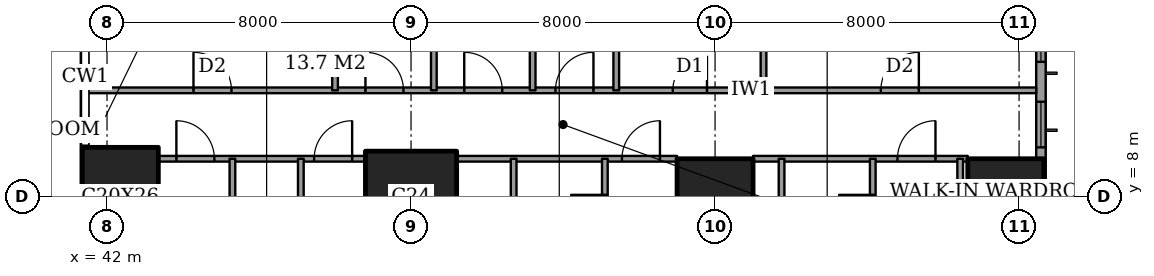
"""IFC4 building model, lengths in metres.
Left out: names, types, materials, properties, quantities, classifications, styles, units other than length and angle.
Written with IfcOpenShell. Run it as: python <this file> out.ifc"""

import sys

from ifc_helpers import new_model, si_unit, direction, frame, frame_2d, origin, origin_2d, place, context, subcontext, project, spatial, rectangle, extrude, element, fill, save


model = new_model("IFC4")
c1 = context("Model", 3, precision=1e-05, world=origin(), true_north=direction((0.0, 1.0)))
c2 = subcontext(c1, "Body", "Model", "MODEL_VIEW")
j1 = project(units=[si_unit("LENGTHUNIT", "METRE"), si_unit("PLANEANGLEUNIT", "RADIAN")], contexts=[c1])
p1 = place(None, origin())
s1 = spatial("IfcSite", under=j1, at=p1, CompositionType="ELEMENT")
p2 = place(p1, origin())
s2 = spatial("IfcBuilding", under=s1, at=p2, CompositionType="ELEMENT")
p3 = place(p2, frame((0.0, 0.0, 51.2)))
s3 = spatial("IfcBuildingStorey", under=s2, at=p3, CompositionType="ELEMENT", Elevation=51.2)
p4 = place(p3, frame((42.35, 8.0, 0.0), z_axis=(0.0, 0.0, 1.0), x_axis=(1.0, 0.0, 0.0)))
e1 = element("IfcColumn", 1, at=p4, inside=s3, PredefinedType="COLUMN", context=c2, shape_type="SweptSolid", body=[
    extrude(rectangle(XDim=2.0, YDim=2.6, at=origin_2d()), origin(), (0.0, 0.0, 1.0), 3.6),
])
p5 = place(p3, frame((50.0, 8.0, 0.0), z_axis=(0.0, 0.0, 1.0), x_axis=(1.0, 0.0, 0.0)))
e2 = element("IfcColumn", 2, at=p5, inside=s3, PredefinedType="COLUMN", context=c2, shape_type="SweptSolid", body=[
    extrude(rectangle(XDim=2.4, YDim=2.4, at=origin_2d()), origin(), (0.0, 0.0, 1.0), 3.6),
])
for number, where, z_axis, x_axis in (
    (3, (58.0, 8.0, 0.0), (0.0, 0.0, 1.0), (1.0, 0.0, 0.0)),
    (4, (65.65, 8.0, 0.0), (0.0, 0.0, 1.0), (1.0, 0.0, 0.0)),
):
    element("IfcColumn", number, at=place(p3, frame(where, z_axis=z_axis, x_axis=x_axis)), inside=s3, PredefinedType="COLUMN", context=c2, shape_type="SweptSolid", body=[
        extrude(rectangle(XDim=2.0, YDim=2.0, at=origin_2d()), origin(), (0.0, 0.0, 1.0), 3.6),
    ])
p6 = place(p3, frame((66.575, 3.175, 0.0), z_axis=(0.0, 0.0, 1.0), x_axis=(0.0, 1.0, 0.0)))
e5 = element("IfcWall", 5, at=p6, inside=s3, PredefinedType="SOLIDWALL", context=c2, shape_type="SweptSolid", body=[
    extrude(rectangle(XDim=41.65, YDim=0.25, at=frame_2d((20.825, 0.0))), origin(), (0.0, 0.0, 1.0), 3.6),
])
p7 = place(p6, frame((0.775, 0.0, 0.6)))
e6 = element("IfcOpeningElement", 6, at=p7, cuts=e5, PredefinedType="OPENING", context=c2, shape_type="SweptSolid", body=[
    extrude(rectangle(XDim=2.4, YDim=2.0, at=frame_2d((1.2, 1.0))), frame((0.0, 0.135, 0.0), z_axis=(0.0, -1.0, 0.0), x_axis=(1.0, 0.0, 0.0)), (0.0, 0.0, 1.0), 0.27),
])
p8 = place(p6, frame((6.125, 0.0, 0.6)))
e7 = element("IfcOpeningElement", 7, at=p8, cuts=e5, PredefinedType="OPENING", context=c2, shape_type="SweptSolid", body=[
    extrude(rectangle(XDim=1.2, YDim=2.0, at=frame_2d((0.6, 1.0))), frame((0.0, 0.135, 0.0), z_axis=(0.0, -1.0, 0.0), x_axis=(1.0, 0.0, 0.0)), (0.0, 0.0, 1.0), 0.27),
])
p9 = place(p6, frame((8.375, 0.0, 0.6)))
e8 = element("IfcOpeningElement", 8, at=p9, cuts=e5, PredefinedType="OPENING", context=c2, shape_type="SweptSolid", body=[
    extrude(rectangle(XDim=2.4, YDim=2.0, at=frame_2d((1.2, 1.0))), frame((0.0, 0.135, 0.0), z_axis=(0.0, -1.0, 0.0), x_axis=(1.0, 0.0, 0.0)), (0.0, 0.0, 1.0), 0.27),
])
p10 = place(p6, frame((15.775, 0.0, 0.6)))
e9 = element("IfcOpeningElement", 9, at=p10, cuts=e5, PredefinedType="OPENING", context=c2, shape_type="SweptSolid", body=[
    extrude(rectangle(XDim=2.4, YDim=2.0, at=frame_2d((1.2, 1.0))), frame((0.0, 0.135, 0.0), z_axis=(0.0, -1.0, 0.0), x_axis=(1.0, 0.0, 0.0)), (0.0, 0.0, 1.0), 0.27),
])
p11 = place(p6, frame((23.475, 0.0, 0.6)))
e10 = element("IfcOpeningElement", 10, at=p11, cuts=e5, PredefinedType="OPENING", context=c2, shape_type="SweptSolid", body=[
    extrude(rectangle(XDim=2.4, YDim=2.0, at=frame_2d((1.2, 1.0))), frame((0.0, 0.135, 0.0), z_axis=(0.0, -1.0, 0.0), x_axis=(1.0, 0.0, 0.0)), (0.0, 0.0, 1.0), 0.27),
])
p12 = place(p6, frame((30.775, 0.0, 0.6)))
e11 = element("IfcOpeningElement", 11, at=p12, cuts=e5, PredefinedType="OPENING", context=c2, shape_type="SweptSolid", body=[
    extrude(rectangle(XDim=2.4, YDim=2.0, at=frame_2d((1.2, 1.0))), frame((0.0, 0.135, 0.0), z_axis=(0.0, -1.0, 0.0), x_axis=(1.0, 0.0, 0.0)), (0.0, 0.0, 1.0), 0.27),
])
p13 = place(p6, frame((34.125, 0.0, 0.6)))
e12 = element("IfcOpeningElement", 12, at=p13, cuts=e5, PredefinedType="OPENING", context=c2, shape_type="SweptSolid", body=[
    extrude(rectangle(XDim=1.2, YDim=2.0, at=frame_2d((0.6, 1.0))), frame((0.0, 0.135, 0.0), z_axis=(0.0, -1.0, 0.0), x_axis=(1.0, 0.0, 0.0)), (0.0, 0.0, 1.0), 0.27),
])
p14 = place(p6, frame((38.475, 0.0, 0.6)))
e13 = element("IfcOpeningElement", 13, at=p14, cuts=e5, PredefinedType="OPENING", context=c2, shape_type="SweptSolid", body=[
    extrude(rectangle(XDim=2.4, YDim=2.0, at=frame_2d((1.2, 1.0))), frame((0.0, 0.135, 0.0), z_axis=(0.0, -1.0, 0.0), x_axis=(1.0, 0.0, 0.0)), (0.0, 0.0, 1.0), 0.27),
])
p15 = place(p3, frame((43.35, 9.0, 0.0), z_axis=(0.0, 0.0, 1.0), x_axis=(1.0, 0.0, 0.0)))
e14 = element("IfcWall", 14, at=p15, inside=s3, PredefinedType="PARTITIONING", context=c2, shape_type="SweptSolid", body=[
    extrude(rectangle(XDim=5.45, YDim=0.15, at=frame_2d((2.725, 0.0))), origin(), (0.0, 0.0, 1.0), 3.35),
])
p16 = place(p15, frame((4.1, 0.0, 0.0)))
e15 = element("IfcOpeningElement", 15, at=p16, cuts=e14, PredefinedType="OPENING", context=c2, shape_type="SweptSolid", body=[
    extrude(rectangle(XDim=1.0, YDim=2.1, at=frame_2d((0.5, 1.05))), frame((0.0, 0.085, 0.0), z_axis=(0.0, -1.0, 0.0), x_axis=(1.0, 0.0, 0.0)), (0.0, 0.0, 1.0), 0.17),
])
p17 = place(p15, frame((0.475, 0.0, 0.0)))
e16 = element("IfcOpeningElement", 16, at=p17, cuts=e14, PredefinedType="OPENING", context=c2, shape_type="SweptSolid", body=[
    extrude(rectangle(XDim=1.0, YDim=2.1, at=frame_2d((0.5, 1.05))), frame((0.0, 0.085, 0.0), z_axis=(0.0, -1.0, 0.0), x_axis=(1.0, 0.0, 0.0)), (0.0, 0.0, 1.0), 0.17),
])
p18 = place(p3, frame((51.2, 9.0, 0.0), z_axis=(0.0, 0.0, 1.0), x_axis=(1.0, 0.0, 0.0)))
e17 = element("IfcWall", 17, at=p18, inside=s3, PredefinedType="PARTITIONING", context=c2, shape_type="SweptSolid", body=[
    extrude(rectangle(XDim=5.8, YDim=0.15, at=frame_2d((2.9, 0.0))), origin(), (0.0, 0.0, 1.0), 3.35),
])
p19 = place(p18, frame((4.35, 0.0, 0.0)))
e18 = element("IfcOpeningElement", 18, at=p19, cuts=e17, PredefinedType="OPENING", context=c2, shape_type="SweptSolid", body=[
    extrude(rectangle(XDim=1.0, YDim=2.1, at=frame_2d((0.5, 1.05))), frame((0.0, 0.085, 0.0), z_axis=(0.0, -1.0, 0.0), x_axis=(1.0, 0.0, 0.0)), (0.0, 0.0, 1.0), 0.17),
])
p20 = place(p3, frame((59.0, 9.0, 0.0), z_axis=(0.0, 0.0, 1.0), x_axis=(1.0, 0.0, 0.0)))
e19 = element("IfcWall", 19, at=p20, inside=s3, PredefinedType="PARTITIONING", context=c2, shape_type="SweptSolid", body=[
    extrude(rectangle(XDim=5.65, YDim=0.15, at=frame_2d((2.825, 0.0))), origin(), (0.0, 0.0, 1.0), 3.35),
])
p21 = place(p20, frame((3.8, 0.0, 0.0)))
e20 = element("IfcOpeningElement", 20, at=p21, cuts=e19, PredefinedType="OPENING", context=c2, shape_type="SweptSolid", body=[
    extrude(rectangle(XDim=1.0, YDim=2.1, at=frame_2d((0.5, 1.05))), frame((0.0, 0.085, 0.0), z_axis=(0.0, -1.0, 0.0), x_axis=(1.0, 0.0, 0.0)), (0.0, 0.0, 1.0), 0.17),
])
p22 = place(p3, frame((41.439, 10.8, 0.0), z_axis=(0.0, 0.0, 1.0), x_axis=(1.0, 0.0, 0.0)))
e21 = element("IfcWall", 21, at=p22, inside=s3, PredefinedType="PARTITIONING", context=c2, shape_type="SweptSolid", body=[
    extrude(rectangle(XDim=25.011, YDim=0.15, at=frame_2d((12.505, 0.0))), origin(), (0.0, 0.0, 1.0), 3.35),
])
p23 = place(p22, frame((12.361, 0.0, 0.0)))
e22 = element("IfcOpeningElement", 22, at=p23, cuts=e21, PredefinedType="OPENING", context=c2, shape_type="SweptSolid", body=[
    extrude(rectangle(XDim=1.0, YDim=2.1, at=frame_2d((0.5, 1.05))), frame((0.0, 0.085, 0.0), z_axis=(0.0, -1.0, 0.0), x_axis=(1.0, 0.0, 0.0)), (0.0, 0.0, 1.0), 0.17),
])
p24 = place(p22, frame((20.924, 0.0, 0.0)))
e23 = element("IfcOpeningElement", 23, at=p24, cuts=e21, PredefinedType="OPENING", context=c2, shape_type="SweptSolid", body=[
    extrude(rectangle(XDim=1.0, YDim=2.1, at=frame_2d((0.5, 1.05))), frame((0.0, 0.085, 0.0), z_axis=(0.0, -1.0, 0.0), x_axis=(1.0, 0.0, 0.0)), (0.0, 0.0, 1.0), 0.17),
])
p25 = place(p22, frame((15.448, 0.0, 0.0)))
e24 = element("IfcOpeningElement", 24, at=p25, cuts=e21, PredefinedType="OPENING", context=c2, shape_type="SweptSolid", body=[
    extrude(rectangle(XDim=0.9, YDim=2.1, at=frame_2d((0.45, 1.05))), frame((0.0, 0.085, 0.0), z_axis=(0.0, -1.0, 0.0), x_axis=(1.0, 0.0, 0.0)), (0.0, 0.0, 1.0), 0.17),
])
p26 = place(p22, frame((9.961, 0.0, 0.0)))
e25 = element("IfcOpeningElement", 25, at=p26, cuts=e21, PredefinedType="OPENING", context=c2, shape_type="SweptSolid", body=[
    extrude(rectangle(XDim=1.0, YDim=2.1, at=frame_2d((0.5, 1.05))), frame((0.0, 0.085, 0.0), z_axis=(0.0, -1.0, 0.0), x_axis=(1.0, 0.0, 0.0)), (0.0, 0.0, 1.0), 0.17),
])
p27 = place(p22, frame((7.361, 0.0, 0.0)))
e26 = element("IfcOpeningElement", 26, at=p27, cuts=e21, PredefinedType="OPENING", context=c2, shape_type="SweptSolid", body=[
    extrude(rectangle(XDim=1.0, YDim=2.1, at=frame_2d((0.5, 1.05))), frame((0.0, 0.085, 0.0), z_axis=(0.0, -1.0, 0.0), x_axis=(1.0, 0.0, 0.0)), (0.0, 0.0, 1.0), 0.17),
])
p28 = place(p22, frame((2.836, 0.0, 0.0)))
e27 = element("IfcOpeningElement", 27, at=p28, cuts=e21, PredefinedType="OPENING", context=c2, shape_type="SweptSolid", body=[
    extrude(rectangle(XDim=1.0, YDim=2.1, at=frame_2d((0.5, 1.05))), frame((0.0, 0.085, 0.0), z_axis=(0.0, -1.0, 0.0), x_axis=(1.0, 0.0, 0.0)), (0.0, 0.0, 1.0), 0.17),
])
p29 = place(p3, frame((45.3, -0.45, 0.0), z_axis=(0.0, 0.0, 1.0), x_axis=(0.0, 1.0, 0.0)))
e28 = element("IfcWall", 28, at=p29, inside=s3, PredefinedType="PARTITIONING", context=c2, shape_type="SweptSolid", body=[
    extrude(rectangle(XDim=9.45, YDim=0.15, at=frame_2d((4.725, 0.0))), origin(), (0.0, 0.0, 1.0), 3.35),
])
p30 = place(p3, frame((47.1, 5.2, 0.0), z_axis=(0.0, 0.0, 1.0), x_axis=(0.0, 1.0, 0.0)))
e29 = element("IfcWall", 29, at=p30, inside=s3, PredefinedType="PARTITIONING", context=c2, shape_type="SweptSolid", body=[
    extrude(rectangle(XDim=3.8, YDim=0.15, at=frame_2d((1.9, 0.0))), origin(), (0.0, 0.0, 1.0), 3.35),
])
p31 = place(p30, frame((1.45, 0.0, 0.0)))
e30 = element("IfcOpeningElement", 30, at=p31, cuts=e29, PredefinedType="OPENING", context=c2, shape_type="SweptSolid", body=[
    extrude(rectangle(XDim=0.9, YDim=2.1, at=frame_2d((0.45, 1.05))), frame((0.0, 0.085, 0.0), z_axis=(0.0, -1.0, 0.0), x_axis=(1.0, 0.0, 0.0)), (0.0, 0.0, 1.0), 0.17),
])
p32 = place(p3, frame((48.0, 10.8, 0.0), z_axis=(0.0, 0.0, 1.0), x_axis=(0.0, 1.0, 0.0)))
e31 = element("IfcWall", 31, at=p32, inside=s3, PredefinedType="PARTITIONING", context=c2, shape_type="SweptSolid", body=[
    extrude(rectangle(XDim=6.7, YDim=0.15, at=frame_2d((3.35, 0.0))), origin(), (0.0, 0.0, 1.0), 3.35),
])
p33 = place(p3, frame((50.6, 10.8, 0.0), z_axis=(0.0, 0.0, 1.0), x_axis=(0.0, 1.0, 0.0)))
e32 = element("IfcWall", 32, at=p33, inside=s3, PredefinedType="PARTITIONING", context=c2, shape_type="SweptSolid", body=[
    extrude(rectangle(XDim=4.0, YDim=0.15, at=frame_2d((2.0, 0.0))), origin(), (0.0, 0.0, 1.0), 3.35),
])
p34 = place(p3, frame((52.7, -0.45, 0.0), z_axis=(0.0, 0.0, 1.0), x_axis=(0.0, 1.0, 0.0)))
e33 = element("IfcWall", 33, at=p34, inside=s3, PredefinedType="PARTITIONING", context=c2, shape_type="SweptSolid", body=[
    extrude(rectangle(XDim=9.45, YDim=0.15, at=frame_2d((4.725, 0.0))), origin(), (0.0, 0.0, 1.0), 3.35),
])
p35 = place(p34, frame((2.875, 0.0, 0.0)))
e34 = element("IfcOpeningElement", 34, at=p35, cuts=e33, PredefinedType="OPENING", context=c2, shape_type="SweptSolid", body=[
    extrude(rectangle(XDim=0.9, YDim=2.1, at=frame_2d((0.45, 1.05))), frame((0.0, 0.085, 0.0), z_axis=(0.0, -1.0, 0.0), x_axis=(1.0, 0.0, 0.0)), (0.0, 0.0, 1.0), 0.17),
])
p36 = place(p3, frame((53.2, 10.8, 0.0), z_axis=(0.0, 0.0, 1.0), x_axis=(0.0, 1.0, 0.0)))
e35 = element("IfcWall", 35, at=p36, inside=s3, PredefinedType="PARTITIONING", context=c2, shape_type="SweptSolid", body=[
    extrude(rectangle(XDim=6.7, YDim=0.15, at=frame_2d((3.35, 0.0))), origin(), (0.0, 0.0, 1.0), 3.35),
])
p37 = place(p3, frame((55.1, 6.2, 0.0), z_axis=(0.0, 0.0, 1.0), x_axis=(0.0, 1.0, 0.0)))
e36 = element("IfcWall", 36, at=p37, inside=s3, PredefinedType="PARTITIONING", context=c2, shape_type="SweptSolid", body=[
    extrude(rectangle(XDim=2.8, YDim=0.15, at=frame_2d((1.4, 0.0))), origin(), (0.0, 0.0, 1.0), 3.35),
])
p38 = place(p37, frame((0.95, 0.0, 0.0)))
e37 = element("IfcOpeningElement", 37, at=p38, cuts=e36, PredefinedType="OPENING", context=c2, shape_type="SweptSolid", body=[
    extrude(rectangle(XDim=0.9, YDim=2.1, at=frame_2d((0.45, 1.05))), frame((0.0, 0.085, 0.0), z_axis=(0.0, -1.0, 0.0), x_axis=(1.0, 0.0, 0.0)), (0.0, 0.0, 1.0), 0.17),
])
p39 = place(p3, frame((55.4, 10.8, 0.0), z_axis=(0.0, 0.0, 1.0), x_axis=(0.0, 1.0, 0.0)))
e38 = element("IfcWall", 38, at=p39, inside=s3, PredefinedType="PARTITIONING", context=c2, shape_type="SweptSolid", body=[
    extrude(rectangle(XDim=10.8, YDim=0.15, at=frame_2d((5.4, 0.0))), origin(), (0.0, 0.0, 1.0), 3.35),
])
p40 = place(p39, frame((8.25, 0.0, 0.0)))
e39 = element("IfcOpeningElement", 39, at=p40, cuts=e38, PredefinedType="OPENING", context=c2, shape_type="SweptSolid", body=[
    extrude(rectangle(XDim=1.0, YDim=2.1, at=frame_2d((0.5, 1.05))), frame((0.0, 0.085, 0.0), z_axis=(0.0, -1.0, 0.0), x_axis=(1.0, 0.0, 0.0)), (0.0, 0.0, 1.0), 0.17),
])
p41 = place(p3, frame((59.275, 10.8, 0.0), z_axis=(0.0, 0.0, 1.0), x_axis=(0.0, 1.0, 0.0)))
e40 = element("IfcWall", 40, at=p41, inside=s3, PredefinedType="PARTITIONING", context=c2, shape_type="SweptSolid", body=[
    extrude(rectangle(XDim=4.0, YDim=0.15, at=frame_2d((2.0, 0.0))), origin(), (0.0, 0.0, 1.0), 3.35),
])
p42 = place(p3, frame((59.75, -0.45, 0.0), z_axis=(0.0, 0.0, 1.0), x_axis=(0.0, 1.0, 0.0)))
e41 = element("IfcWall", 41, at=p42, inside=s3, PredefinedType="PARTITIONING", context=c2, shape_type="SweptSolid", body=[
    extrude(rectangle(XDim=9.45, YDim=0.15, at=frame_2d((4.725, 0.0))), origin(), (0.0, 0.0, 1.0), 3.35),
])
p43 = place(p42, frame((2.875, 0.0, 0.0)))
e42 = element("IfcOpeningElement", 42, at=p43, cuts=e41, PredefinedType="OPENING", context=c2, shape_type="SweptSolid", body=[
    extrude(rectangle(XDim=0.9, YDim=2.1, at=frame_2d((0.45, 1.05))), frame((0.0, 0.085, 0.0), z_axis=(0.0, -1.0, 0.0), x_axis=(1.0, 0.0, 0.0)), (0.0, 0.0, 1.0), 0.17),
])
p44 = place(p3, frame((62.15, 6.2, 0.0), z_axis=(0.0, 0.0, 1.0), x_axis=(0.0, 1.0, 0.0)))
e43 = element("IfcWall", 43, at=p44, inside=s3, PredefinedType="PARTITIONING", context=c2, shape_type="SweptSolid", body=[
    extrude(rectangle(XDim=2.8, YDim=0.15, at=frame_2d((1.4, 0.0))), origin(), (0.0, 0.0, 1.0), 3.35),
])
p45 = place(p44, frame((0.95, 0.0, 0.0)))
e44 = element("IfcOpeningElement", 44, at=p45, cuts=e43, PredefinedType="OPENING", context=c2, shape_type="SweptSolid", body=[
    extrude(rectangle(XDim=0.9, YDim=2.1, at=frame_2d((0.45, 1.05))), frame((0.0, 0.085, 0.0), z_axis=(0.0, -1.0, 0.0), x_axis=(1.0, 0.0, 0.0)), (0.0, 0.0, 1.0), 0.17),
])
p46 = place(p3, frame((64.45, 3.3, 0.0), z_axis=(0.0, 0.0, 1.0), x_axis=(0.0, 1.0, 0.0)))
e45 = element("IfcWall", 45, at=p46, inside=s3, PredefinedType="PARTITIONING", context=c2, shape_type="SweptSolid", body=[
    extrude(rectangle(XDim=5.7, YDim=0.15, at=frame_2d((2.85, 0.0))), origin(), (0.0, 0.0, 1.0), 3.35),
])
p47 = place(p46, frame((2.4, 0.0, 0.0)))
e46 = element("IfcOpeningElement", 46, at=p47, cuts=e45, PredefinedType="OPENING", context=c2, shape_type="SweptSolid", body=[
    extrude(rectangle(XDim=0.9, YDim=2.1, at=frame_2d((0.45, 1.05))), frame((0.0, 0.085, 0.0), z_axis=(0.0, -1.0, 0.0), x_axis=(1.0, 0.0, 0.0)), (0.0, 0.0, 1.0), 0.17),
])
p48 = place(p8, origin())
e47 = element("IfcWindow", 47, at=p48, inside=s3, PartitioningType="SINGLE_PANEL", PredefinedType="WINDOW", context=c2, shape_type="SweptSolid", body=[
    extrude(rectangle(XDim=1.2, YDim=2.0, at=frame_2d((0.6, 1.0))), frame((0.0, 0.03, 0.0), z_axis=(0.0, -1.0, 0.0), x_axis=(1.0, 0.0, 0.0)), (0.0, 0.0, 1.0), 0.06),
])
fill(e7, e47)
p49 = place(p9, origin())
e48 = element("IfcWindow", 48, at=p49, inside=s3, PartitioningType="SINGLE_PANEL", PredefinedType="WINDOW", context=c2, shape_type="SweptSolid", body=[
    extrude(rectangle(XDim=2.4, YDim=2.0, at=frame_2d((1.2, 1.0))), frame((0.0, 0.03, 0.0), z_axis=(0.0, -1.0, 0.0), x_axis=(1.0, 0.0, 0.0)), (0.0, 0.0, 1.0), 0.06),
])
fill(e8, e48)
p50 = place(p45, origin())
e49 = element("IfcDoor", 49, at=p50, inside=s3, OperationType="SINGLE_SWING_LEFT", PredefinedType="DOOR", context=c2, shape_type="SweptSolid", body=[
    extrude(rectangle(XDim=0.9, YDim=2.1, at=frame_2d((0.45, 1.05))), frame((0.0, 0.025, 0.0), z_axis=(0.0, -1.0, 0.0), x_axis=(1.0, 0.0, 0.0)), (0.0, 0.0, 1.0), 0.05),
])
fill(e44, e49)
p51 = place(p21, origin())
e50 = element("IfcDoor", 50, at=p51, inside=s3, OperationType="SINGLE_SWING_LEFT", PredefinedType="DOOR", context=c2, shape_type="SweptSolid", body=[
    extrude(rectangle(XDim=1.0, YDim=2.1, at=frame_2d((0.5, 1.05))), frame((0.0, 0.025, 0.0), z_axis=(0.0, -1.0, 0.0), x_axis=(1.0, 0.0, 0.0)), (0.0, 0.0, 1.0), 0.05),
])
fill(e20, e50)
p52 = place(p38, origin())
e51 = element("IfcDoor", 51, at=p52, inside=s3, OperationType="SINGLE_SWING_LEFT", PredefinedType="DOOR", context=c2, shape_type="SweptSolid", body=[
    extrude(rectangle(XDim=0.9, YDim=2.1, at=frame_2d((0.45, 1.05))), frame((0.0, 0.025, 0.0), z_axis=(0.0, -1.0, 0.0), x_axis=(1.0, 0.0, 0.0)), (0.0, 0.0, 1.0), 0.05),
])
fill(e37, e51)
p53 = place(p19, origin())
e52 = element("IfcDoor", 52, at=p53, inside=s3, OperationType="SINGLE_SWING_LEFT", PredefinedType="DOOR", context=c2, shape_type="SweptSolid", body=[
    extrude(rectangle(XDim=1.0, YDim=2.1, at=frame_2d((0.5, 1.05))), frame((0.0, 0.025, 0.0), z_axis=(0.0, -1.0, 0.0), x_axis=(1.0, 0.0, 0.0)), (0.0, 0.0, 1.0), 0.05),
])
fill(e18, e52)
p54 = place(p16, origin())
e53 = element("IfcDoor", 53, at=p54, inside=s3, OperationType="SINGLE_SWING_LEFT", PredefinedType="DOOR", context=c2, shape_type="SweptSolid", body=[
    extrude(rectangle(XDim=1.0, YDim=2.1, at=frame_2d((0.5, 1.05))), frame((0.0, 0.025, 0.0), z_axis=(0.0, -1.0, 0.0), x_axis=(1.0, 0.0, 0.0)), (0.0, 0.0, 1.0), 0.05),
])
fill(e15, e53)
p55 = place(p17, origin())
e54 = element("IfcDoor", 54, at=p55, inside=s3, OperationType="SINGLE_SWING_RIGHT", PredefinedType="DOOR", context=c2, shape_type="SweptSolid", body=[
    extrude(rectangle(XDim=1.0, YDim=2.1, at=frame_2d((0.5, 1.05))), frame((0.0, 0.025, 0.0), z_axis=(0.0, -1.0, 0.0), x_axis=(1.0, 0.0, 0.0)), (0.0, 0.0, 1.0), 0.05),
])
fill(e16, e54)
p56 = place(p23, origin())
e55 = element("IfcDoor", 55, at=p56, inside=s3, OperationType="SINGLE_SWING_LEFT", PredefinedType="DOOR", context=c2, shape_type="SweptSolid", body=[
    extrude(rectangle(XDim=1.0, YDim=2.1, at=frame_2d((0.5, 1.05))), frame((0.0, 0.025, 0.0), z_axis=(0.0, -1.0, 0.0), x_axis=(1.0, 0.0, 0.0)), (0.0, 0.0, 1.0), 0.05),
])
fill(e22, e55)
p57 = place(p24, origin())
e56 = element("IfcDoor", 56, at=p57, inside=s3, OperationType="SINGLE_SWING_LEFT", PredefinedType="DOOR", context=c2, shape_type="SweptSolid", body=[
    extrude(rectangle(XDim=1.0, YDim=2.1, at=frame_2d((0.5, 1.05))), frame((0.0, 0.025, 0.0), z_axis=(0.0, -1.0, 0.0), x_axis=(1.0, 0.0, 0.0)), (0.0, 0.0, 1.0), 0.05),
])
fill(e23, e56)
p58 = place(p25, origin())
e57 = element("IfcDoor", 57, at=p58, inside=s3, OperationType="SINGLE_SWING_LEFT", PredefinedType="DOOR", context=c2, shape_type="SweptSolid", body=[
    extrude(rectangle(XDim=0.9, YDim=2.1, at=frame_2d((0.45, 1.05))), frame((0.0, 0.025, 0.0), z_axis=(0.0, -1.0, 0.0), x_axis=(1.0, 0.0, 0.0)), (0.0, 0.0, 1.0), 0.05),
])
fill(e24, e57)
p59 = place(p26, origin())
e58 = element("IfcDoor", 58, at=p59, inside=s3, OperationType="SINGLE_SWING_RIGHT", PredefinedType="DOOR", context=c2, shape_type="SweptSolid", body=[
    extrude(rectangle(XDim=1.0, YDim=2.1, at=frame_2d((0.5, 1.05))), frame((0.0, 0.025, 0.0), z_axis=(0.0, -1.0, 0.0), x_axis=(1.0, 0.0, 0.0)), (0.0, 0.0, 1.0), 0.05),
])
fill(e25, e58)
p60 = place(p27, origin())
e59 = element("IfcDoor", 59, at=p60, inside=s3, OperationType="SINGLE_SWING_RIGHT", PredefinedType="DOOR", context=c2, shape_type="SweptSolid", body=[
    extrude(rectangle(XDim=1.0, YDim=2.1, at=frame_2d((0.5, 1.05))), frame((0.0, 0.025, 0.0), z_axis=(0.0, -1.0, 0.0), x_axis=(1.0, 0.0, 0.0)), (0.0, 0.0, 1.0), 0.05),
])
fill(e26, e59)
p61 = place(p28, origin())
e60 = element("IfcDoor", 60, at=p61, inside=s3, OperationType="SINGLE_SWING_RIGHT", PredefinedType="DOOR", context=c2, shape_type="SweptSolid", body=[
    extrude(rectangle(XDim=1.0, YDim=2.1, at=frame_2d((0.5, 1.05))), frame((0.0, 0.025, 0.0), z_axis=(0.0, -1.0, 0.0), x_axis=(1.0, 0.0, 0.0)), (0.0, 0.0, 1.0), 0.05),
])
fill(e27, e60)
save(model, sys.argv[1])
